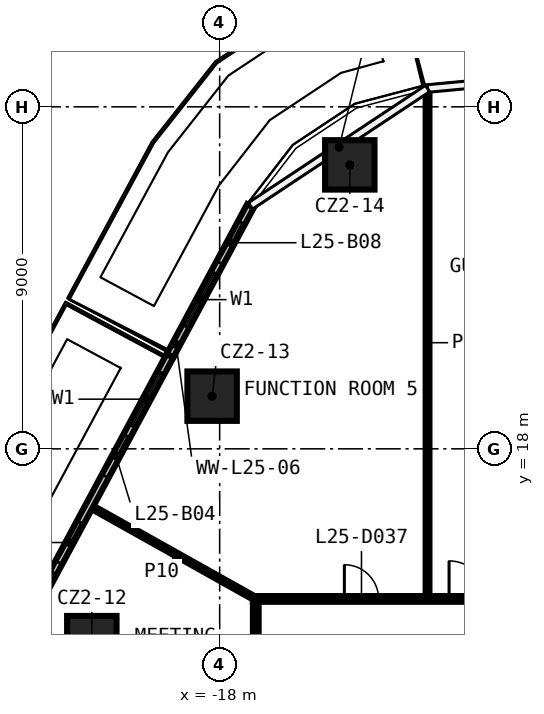
"""IFC4 building model, lengths in metres.
Left out: names, types, materials, properties, quantities, classifications, styles, units other than length and angle.
Written with IfcOpenShell. Run it as: python <this file> out.ifc"""

import sys

from ifc_helpers import new_model, si_unit, direction, frame, frame_2d, origin, origin_2d, place, context, subcontext, project, spatial, rectangle, extrude, element, fill, save


model = new_model("IFC4")
c1 = context("Model", 3, precision=1e-05, world=origin(), true_north=direction((0.0, 1.0)))
c2 = subcontext(c1, "Body", "Model", "MODEL_VIEW")
j1 = project(units=[si_unit("LENGTHUNIT", "METRE"), si_unit("PLANEANGLEUNIT", "RADIAN")], contexts=[c1])
p1 = place(None, origin())
s1 = spatial("IfcSite", under=j1, at=p1, CompositionType="ELEMENT")
p2 = place(p1, origin())
s2 = spatial("IfcBuilding", under=s1, at=p2, CompositionType="ELEMENT")
p3 = place(p2, frame((0.0, 0.0, 117.4)))
s3 = spatial("IfcBuildingStorey", under=s2, at=p3, CompositionType="ELEMENT", Elevation=117.4)
for number, where, z_axis, x_axis in (
    (1, (-21.364, 12.952, 0.0), (0.0, 0.0, 1.0), (1.0, 0.0, 0.0)),
    (2, (-18.199, 19.386, 0.0), (0.0, 0.0, 1.0), (1.0, 0.0, 0.0)),
    (3, (-14.576, 25.472, 0.0), (0.0, 0.0, 1.0), (1.0, 0.0, 0.0)),
):
    element("IfcColumn", number, at=place(p3, frame(where, z_axis=z_axis, x_axis=x_axis)), inside=s3, PredefinedType="COLUMN", context=c2, shape_type="SweptSolid", body=[
        extrude(rectangle(XDim=1.3, YDim=1.3, at=origin_2d()), origin(), (0.0, 0.0, 1.0), 3.3),
    ])
p4 = place(p3, frame((-17.125, 14.05, 0.0), z_axis=(0.0, 0.0, 1.0), x_axis=(1.0, 0.0, 0.0)))
e4 = element("IfcWall", 4, at=p4, inside=s3, PredefinedType="PARTITIONING", context=c2, shape_type="SweptSolid", body=[
    extrude(rectangle(XDim=34.25, YDim=0.15, at=frame_2d((17.125, 0.0))), origin(), (0.0, 0.0, 1.0), 3.3),
])
p5 = place(p4, frame((30.377, 0.0, 0.0)))
e5 = element("IfcOpeningElement", 5, at=p5, cuts=e4, PredefinedType="OPENING", context=c2, shape_type="SweptSolid", body=[
    extrude(rectangle(XDim=0.9, YDim=2.1, at=frame_2d((0.45, 1.05))), frame((0.0, 0.085, 0.0), z_axis=(0.0, -1.0, 0.0), x_axis=(1.0, 0.0, 0.0)), (0.0, 0.0, 1.0), 0.17),
])
p6 = place(p4, frame((23.321, 0.0, 0.0)))
e6 = element("IfcOpeningElement", 6, at=p6, cuts=e4, PredefinedType="OPENING", context=c2, shape_type="SweptSolid", body=[
    extrude(rectangle(XDim=1.0, YDim=2.1, at=frame_2d((0.5, 1.05))), frame((0.0, 0.085, 0.0), z_axis=(0.0, -1.0, 0.0), x_axis=(1.0, 0.0, 0.0)), (0.0, 0.0, 1.0), 0.17),
])
p7 = place(p4, frame((21.183, 0.0, 0.0)))
e7 = element("IfcOpeningElement", 7, at=p7, cuts=e4, PredefinedType="OPENING", context=c2, shape_type="SweptSolid", body=[
    extrude(rectangle(XDim=1.0, YDim=2.1, at=frame_2d((0.5, 1.05))), frame((0.0, 0.085, 0.0), z_axis=(0.0, -1.0, 0.0), x_axis=(1.0, 0.0, 0.0)), (0.0, 0.0, 1.0), 0.17),
])
p8 = place(p4, frame((14.241, 0.0, 0.0)))
e8 = element("IfcOpeningElement", 8, at=p8, cuts=e4, PredefinedType="OPENING", context=c2, shape_type="SweptSolid", body=[
    extrude(rectangle(XDim=1.0, YDim=2.1, at=frame_2d((0.5, 1.05))), frame((0.0, 0.085, 0.0), z_axis=(0.0, -1.0, 0.0), x_axis=(1.0, 0.0, 0.0)), (0.0, 0.0, 1.0), 0.17),
])
p9 = place(p4, frame((12.099, 0.0, 0.0)))
e9 = element("IfcOpeningElement", 9, at=p9, cuts=e4, PredefinedType="OPENING", context=c2, shape_type="SweptSolid", body=[
    extrude(rectangle(XDim=1.0, YDim=2.1, at=frame_2d((0.5, 1.05))), frame((0.0, 0.085, 0.0), z_axis=(0.0, -1.0, 0.0), x_axis=(1.0, 0.0, 0.0)), (0.0, 0.0, 1.0), 0.17),
])
p10 = place(p4, frame((5.161, 0.0, 0.0)))
e10 = element("IfcOpeningElement", 10, at=p10, cuts=e4, PredefinedType="OPENING", context=c2, shape_type="SweptSolid", body=[
    extrude(rectangle(XDim=1.0, YDim=2.1, at=frame_2d((0.5, 1.05))), frame((0.0, 0.085, 0.0), z_axis=(0.0, -1.0, 0.0), x_axis=(1.0, 0.0, 0.0)), (0.0, 0.0, 1.0), 0.17),
])
p11 = place(p4, frame((2.406, 0.0, 0.0)))
e11 = element("IfcOpeningElement", 11, at=p11, cuts=e4, PredefinedType="OPENING", context=c2, shape_type="SweptSolid", body=[
    extrude(rectangle(XDim=0.9, YDim=2.1, at=frame_2d((0.45, 1.05))), frame((0.0, 0.085, 0.0), z_axis=(0.0, -1.0, 0.0), x_axis=(1.0, 0.0, 0.0)), (0.0, 0.0, 1.0), 0.17),
])
p12 = place(p3, frame((-12.53, 14.125, 0.0), z_axis=(0.0, 0.0, 1.0), x_axis=(0.0, 1.0, 0.0)))
e12 = element("IfcWall", 12, at=p12, inside=s3, PredefinedType="PARTITIONING", context=c2, shape_type="SweptSolid", body=[
    extrude(rectangle(XDim=13.336, YDim=0.1, at=frame_2d((6.668, 0.0))), origin(), (0.0, 0.0, 1.0), 3.3),
])
p13 = place(p3, frame((-17.05, -13.975, 0.0), z_axis=(0.0, 0.0, 1.0), x_axis=(0.0, 1.0, 0.0)))
e13 = element("IfcWall", 13, at=p13, inside=s3, PredefinedType="PARTITIONING", context=c2, shape_type="SweptSolid", body=[
    extrude(rectangle(XDim=27.95, YDim=0.15, at=frame_2d((13.975, 0.0))), origin(), (0.0, 0.0, 1.0), 3.3),
])
p14 = place(p13, frame((11.186, 0.0, 0.0)))
e14 = element("IfcOpeningElement", 14, at=p14, cuts=e13, PredefinedType="OPENING", context=c2, shape_type="SweptSolid", body=[
    extrude(rectangle(XDim=0.9, YDim=2.1, at=frame_2d((0.45, 1.05))), frame((0.0, 0.085, 0.0), z_axis=(0.0, -1.0, 0.0), x_axis=(1.0, 0.0, 0.0)), (0.0, 0.0, 1.0), 0.17),
])
p15 = place(p13, frame((8.404, 0.0, 0.0)))
e15 = element("IfcOpeningElement", 15, at=p15, cuts=e13, PredefinedType="OPENING", context=c2, shape_type="SweptSolid", body=[
    extrude(rectangle(XDim=0.9, YDim=2.1, at=frame_2d((0.45, 1.05))), frame((0.0, 0.085, 0.0), z_axis=(0.0, -1.0, 0.0), x_axis=(1.0, 0.0, 0.0)), (0.0, 0.0, 1.0), 0.17),
])
p16 = place(p13, frame((1.58, 0.0, 0.0)))
e16 = element("IfcOpeningElement", 16, at=p16, cuts=e13, PredefinedType="OPENING", context=c2, shape_type="SweptSolid", body=[
    extrude(rectangle(XDim=0.9, YDim=2.1, at=frame_2d((0.45, 1.05))), frame((0.0, 0.085, 0.0), z_axis=(0.0, -1.0, 0.0), x_axis=(1.0, 0.0, 0.0)), (0.0, 0.0, 1.0), 0.17),
])
p17 = place(p13, frame((24.871, 0.0, 0.0)))
e17 = element("IfcOpeningElement", 17, at=p17, cuts=e13, PredefinedType="OPENING", context=c2, shape_type="SweptSolid", body=[
    extrude(rectangle(XDim=0.9, YDim=2.1, at=frame_2d((0.45, 1.05))), frame((0.0, 0.085, 0.0), z_axis=(0.0, -1.0, 0.0), x_axis=(1.0, 0.0, 0.0)), (0.0, 0.0, 1.0), 0.17),
])
p18 = place(p13, frame((20.159, 0.0, 0.0)))
e18 = element("IfcOpeningElement", 18, at=p18, cuts=e13, PredefinedType="OPENING", context=c2, shape_type="SweptSolid", body=[
    extrude(rectangle(XDim=0.9, YDim=2.1, at=frame_2d((0.45, 1.05))), frame((0.0, 0.085, 0.0), z_axis=(0.0, -1.0, 0.0), x_axis=(1.0, 0.0, 0.0)), (0.0, 0.0, 1.0), 0.17),
])
p19 = place(p13, frame((16.211, 0.0, 0.0)))
e19 = element("IfcOpeningElement", 19, at=p19, cuts=e13, PredefinedType="OPENING", context=c2, shape_type="SweptSolid", body=[
    extrude(rectangle(XDim=0.9, YDim=2.1, at=frame_2d((0.45, 1.05))), frame((0.0, 0.085, 0.0), z_axis=(0.0, -1.0, 0.0), x_axis=(1.0, 0.0, 0.0)), (0.0, 0.0, 1.0), 0.17),
])
p20 = place(p3, frame((-21.411, 16.494, 0.0), z_axis=(0.0, 0.0, 1.0), x_axis=(0.872342728858, -0.488894838803, 0.0)))
e20 = element("IfcWall", 20, at=p20, inside=s3, PredefinedType="PARTITIONING", context=c2, shape_type="SweptSolid", body=[
    extrude(rectangle(XDim=4.999, YDim=0.1, at=frame_2d((2.5, 0.0))), origin(), (0.0, 0.0, 1.0), 3.3),
])
p21 = place(p3, frame((-19.306, 20.451, 0.0), z_axis=(0.0, 0.0, 1.0), x_axis=(-0.473410228211, -0.880842072011, 0.0)))
e21 = element("IfcWall", 21, at=p21, inside=s3, PredefinedType="SOLIDWALL", context=c2, shape_type="SweptSolid", body=[
    extrude(rectangle(XDim=17.928, YDim=0.2, at=frame_2d((8.964, 0.0))), origin(), (0.0, 0.0, 1.0), 3.3),
])
p22 = place(p21, frame((0.5, 0.0, 0.6)))
e22 = element("IfcOpeningElement", 22, at=p22, cuts=e21, PredefinedType="OPENING", context=c2, shape_type="SweptSolid", body=[
    extrude(rectangle(XDim=1.6, YDim=2.4, at=frame_2d((0.8, 1.2))), frame((0.0, 0.11, 0.0), z_axis=(0.0, -1.0, 0.0), x_axis=(1.0, 0.0, 0.0)), (0.0, 0.0, 1.0), 0.22),
])
p23 = place(p21, frame((2.4, 0.0, 0.0)))
e23 = element("IfcOpeningElement", 23, at=p23, cuts=e21, PredefinedType="OPENING", context=c2, shape_type="SweptSolid", body=[
    extrude(rectangle(XDim=1.2, YDim=2.4, at=frame_2d((0.6, 1.2))), frame((0.0, 0.11, 0.0), z_axis=(0.0, -1.0, 0.0), x_axis=(1.0, 0.0, 0.0)), (0.0, 0.0, 1.0), 0.22),
])
p24 = place(p21, frame((6.482, 0.0, 0.6)))
e24 = element("IfcOpeningElement", 24, at=p24, cuts=e21, PredefinedType="OPENING", context=c2, shape_type="SweptSolid", body=[
    extrude(rectangle(XDim=1.6, YDim=2.4, at=frame_2d((0.8, 1.2))), frame((0.0, 0.11, 0.0), z_axis=(0.0, -1.0, 0.0), x_axis=(1.0, 0.0, 0.0)), (0.0, 0.0, 1.0), 0.22),
])
p25 = place(p21, frame((4.982, 0.0, 0.0)))
e25 = element("IfcOpeningElement", 25, at=p25, cuts=e21, PredefinedType="OPENING", context=c2, shape_type="SweptSolid", body=[
    extrude(rectangle(XDim=1.2, YDim=2.4, at=frame_2d((0.6, 1.2))), frame((0.0, 0.11, 0.0), z_axis=(0.0, -1.0, 0.0), x_axis=(1.0, 0.0, 0.0)), (0.0, 0.0, 1.0), 0.22),
])
p26 = place(p21, frame((10.964, 0.0, 0.6)))
e26 = element("IfcOpeningElement", 26, at=p26, cuts=e21, PredefinedType="OPENING", context=c2, shape_type="SweptSolid", body=[
    extrude(rectangle(XDim=1.6, YDim=2.4, at=frame_2d((0.8, 1.2))), frame((0.0, 0.11, 0.0), z_axis=(0.0, -1.0, 0.0), x_axis=(1.0, 0.0, 0.0)), (0.0, 0.0, 1.0), 0.22),
])
p27 = place(p21, frame((9.464, 0.0, 0.0)))
e27 = element("IfcOpeningElement", 27, at=p27, cuts=e21, PredefinedType="OPENING", context=c2, shape_type="SweptSolid", body=[
    extrude(rectangle(XDim=1.2, YDim=2.4, at=frame_2d((0.6, 1.2))), frame((0.0, 0.11, 0.0), z_axis=(0.0, -1.0, 0.0), x_axis=(1.0, 0.0, 0.0)), (0.0, 0.0, 1.0), 0.22),
])
p28 = place(p21, frame((13.946, 0.0, 0.6)))
e28 = element("IfcOpeningElement", 28, at=p28, cuts=e21, PredefinedType="OPENING", context=c2, shape_type="SweptSolid", body=[
    extrude(rectangle(XDim=1.6, YDim=2.4, at=frame_2d((0.8, 1.2))), frame((0.0, 0.11, 0.0), z_axis=(0.0, -1.0, 0.0), x_axis=(1.0, 0.0, 0.0)), (0.0, 0.0, 1.0), 0.22),
])
p29 = place(p21, frame((15.846, 0.0, 0.0)))
e29 = element("IfcOpeningElement", 29, at=p29, cuts=e21, PredefinedType="OPENING", context=c2, shape_type="SweptSolid", body=[
    extrude(rectangle(XDim=1.2, YDim=2.4, at=frame_2d((0.6, 1.2))), frame((0.0, 0.11, 0.0), z_axis=(0.0, -1.0, 0.0), x_axis=(1.0, 0.0, 0.0)), (0.0, 0.0, 1.0), 0.22),
])
p30 = place(p3, frame((-17.188, 24.392, 0.0), z_axis=(0.0, 0.0, 1.0), x_axis=(-0.473387015207, -0.88085454749, 0.0)))
e30 = element("IfcWall", 30, at=p30, inside=s3, PredefinedType="SOLIDWALL", context=c2, shape_type="SweptSolid", body=[
    extrude(rectangle(XDim=4.474, YDim=0.2, at=frame_2d((2.237, 0.0))), origin(), (0.0, 0.0, 1.0), 3.3),
])
p31 = place(p30, frame((2.0, 0.0, 0.6)))
e31 = element("IfcOpeningElement", 31, at=p31, cuts=e30, PredefinedType="OPENING", context=c2, shape_type="SweptSolid", body=[
    extrude(rectangle(XDim=1.6, YDim=2.4, at=frame_2d((0.8, 1.2))), frame((0.0, 0.11, 0.0), z_axis=(0.0, -1.0, 0.0), x_axis=(1.0, 0.0, 0.0)), (0.0, 0.0, 1.0), 0.22),
])
p32 = place(p30, frame((0.5, 0.0, 0.0)))
e32 = element("IfcOpeningElement", 32, at=p32, cuts=e30, PredefinedType="OPENING", context=c2, shape_type="SweptSolid", body=[
    extrude(rectangle(XDim=1.2, YDim=2.4, at=frame_2d((0.6, 1.2))), frame((0.0, 0.11, 0.0), z_axis=(0.0, -1.0, 0.0), x_axis=(1.0, 0.0, 0.0)), (0.0, 0.0, 1.0), 0.22),
])
p33 = place(p10, origin())
e33 = element("IfcDoor", 33, at=p33, inside=s3, OperationType="SINGLE_SWING_RIGHT", PredefinedType="DOOR", context=c2, shape_type="SweptSolid", body=[
    extrude(rectangle(XDim=1.0, YDim=2.1, at=frame_2d((0.5, 1.05))), frame((0.0, 0.025, 0.0), z_axis=(0.0, -1.0, 0.0), x_axis=(1.0, 0.0, 0.0)), (0.0, 0.0, 1.0), 0.05),
])
fill(e10, e33)
p34 = place(p11, origin())
e34 = element("IfcDoor", 34, at=p34, inside=s3, OperationType="SINGLE_SWING_LEFT", PredefinedType="DOOR", context=c2, shape_type="SweptSolid", body=[
    extrude(rectangle(XDim=0.9, YDim=2.1, at=frame_2d((0.45, 1.05))), frame((0.0, 0.025, 0.0), z_axis=(0.0, -1.0, 0.0), x_axis=(1.0, 0.0, 0.0)), (0.0, 0.0, 1.0), 0.05),
])
fill(e11, e34)
p35 = place(p22, origin())
e35 = element("IfcWindow", 35, at=p35, inside=s3, PartitioningType="SINGLE_PANEL", PredefinedType="WINDOW", context=c2, shape_type="SweptSolid", body=[
    extrude(rectangle(XDim=1.6, YDim=2.4, at=frame_2d((0.8, 1.2))), frame((0.0, 0.03, 0.0), z_axis=(0.0, -1.0, 0.0), x_axis=(1.0, 0.0, 0.0)), (0.0, 0.0, 1.0), 0.06),
])
fill(e22, e35)
p36 = place(p23, origin())
e36 = element("IfcDoor", 36, at=p36, inside=s3, OperationType="SLIDING_TO_LEFT", PredefinedType="DOOR", context=c2, shape_type="SweptSolid", body=[
    extrude(rectangle(XDim=1.2, YDim=2.4, at=frame_2d((0.6, 1.2))), frame((0.0, 0.025, 0.0), z_axis=(0.0, -1.0, 0.0), x_axis=(1.0, 0.0, 0.0)), (0.0, 0.0, 1.0), 0.05),
])
fill(e23, e36)
p37 = place(p24, origin())
e37 = element("IfcWindow", 37, at=p37, inside=s3, PartitioningType="SINGLE_PANEL", PredefinedType="WINDOW", context=c2, shape_type="SweptSolid", body=[
    extrude(rectangle(XDim=1.6, YDim=2.4, at=frame_2d((0.8, 1.2))), frame((0.0, 0.03, 0.0), z_axis=(0.0, -1.0, 0.0), x_axis=(1.0, 0.0, 0.0)), (0.0, 0.0, 1.0), 0.06),
])
fill(e24, e37)
p38 = place(p25, origin())
e38 = element("IfcDoor", 38, at=p38, inside=s3, OperationType="SLIDING_TO_LEFT", PredefinedType="DOOR", context=c2, shape_type="SweptSolid", body=[
    extrude(rectangle(XDim=1.2, YDim=2.4, at=frame_2d((0.6, 1.2))), frame((0.0, 0.025, 0.0), z_axis=(0.0, -1.0, 0.0), x_axis=(1.0, 0.0, 0.0)), (0.0, 0.0, 1.0), 0.05),
])
fill(e25, e38)
p39 = place(p31, origin())
e39 = element("IfcWindow", 39, at=p39, inside=s3, PartitioningType="SINGLE_PANEL", PredefinedType="WINDOW", context=c2, shape_type="SweptSolid", body=[
    extrude(rectangle(XDim=1.6, YDim=2.4, at=frame_2d((0.8, 1.2))), frame((0.0, 0.03, 0.0), z_axis=(0.0, -1.0, 0.0), x_axis=(1.0, 0.0, 0.0)), (0.0, 0.0, 1.0), 0.06),
])
fill(e31, e39)
p40 = place(p32, origin())
e40 = element("IfcDoor", 40, at=p40, inside=s3, OperationType="SLIDING_TO_LEFT", PredefinedType="DOOR", context=c2, shape_type="SweptSolid", body=[
    extrude(rectangle(XDim=1.2, YDim=2.4, at=frame_2d((0.6, 1.2))), frame((0.0, 0.025, 0.0), z_axis=(0.0, -1.0, 0.0), x_axis=(1.0, 0.0, 0.0)), (0.0, 0.0, 1.0), 0.05),
])
fill(e32, e40)
save(model, sys.argv[1])
